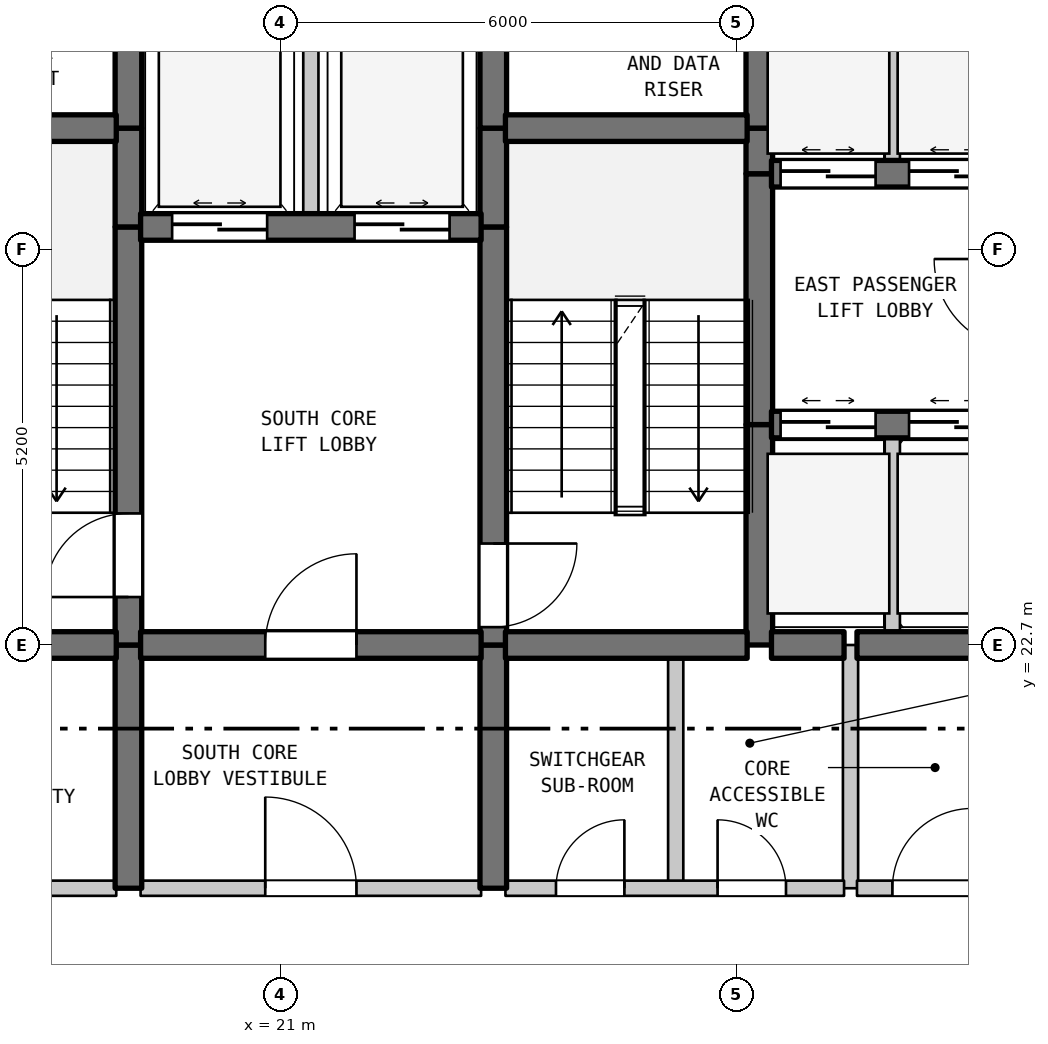
"""IFC4 building model, lengths in metres.
Left out: names, types, materials, properties, quantities, classifications, styles, units other than length and angle.
Written with IfcOpenShell. Run it as: python <this file> out.ifc"""

import sys

from ifc_helpers import new_model, si_unit, direction, frame, frame_2d, origin, place, context, subcontext, project, spatial, rectangle, extrude, element, fill, save


model = new_model("IFC4")
c1 = context("Model", 3, precision=1e-05, world=origin(), true_north=direction((0.0, 1.0)))
c2 = subcontext(c1, "Body", "Model", "MODEL_VIEW")
j1 = project(units=[si_unit("LENGTHUNIT", "METRE"), si_unit("PLANEANGLEUNIT", "RADIAN")], contexts=[c1])
p1 = place(None, origin())
s1 = spatial("IfcSite", under=j1, at=p1, CompositionType="ELEMENT")
p2 = place(p1, origin())
s2 = spatial("IfcBuilding", under=s1, at=p2, CompositionType="ELEMENT")
p3 = place(p2, frame((0.0, 0.0, 35.1)))
s3 = spatial("IfcBuildingStorey", under=s2, at=p3, CompositionType="ELEMENT", Elevation=35.1)
p4 = place(p3, frame((19.0, 19.5, 0.0), z_axis=(0.0, 0.0, 1.0), x_axis=(0.0, 1.0, 0.0)))
e1 = element("IfcWall", 1, at=p4, inside=s3, PredefinedType="SHEAR", context=c2, shape_type="SweptSolid", body=[
    extrude(rectangle(XDim=3.2, YDim=0.35, at=frame_2d((1.6, 0.0))), origin(), (0.0, 0.0, 1.0), 3.385),
])
p5 = place(p3, frame((19.0, 22.7, 0.0), z_axis=(0.0, 0.0, 1.0), x_axis=(0.0, 1.0, 0.0)))
e2 = element("IfcWall", 2, at=p5, inside=s3, PredefinedType="SHEAR", context=c2, shape_type="SweptSolid", body=[
    extrude(rectangle(XDim=5.5, YDim=0.35, at=frame_2d((2.75, 0.0))), origin(), (0.0, 0.0, 1.0), 3.385),
])
p6 = place(p5, frame((0.631, 0.0, 0.0)))
e3 = element("IfcOpeningElement", 3, at=p6, cuts=e2, PredefinedType="OPENING", context=c2, shape_type="SweptSolid", body=[
    extrude(rectangle(XDim=1.1, YDim=2.15, at=frame_2d((0.55, 1.075))), frame((0.0, 0.185, 0.0), z_axis=(0.0, -1.0, 0.0), x_axis=(1.0, 0.0, 0.0)), (0.0, 0.0, 1.0), 0.37),
])
p7 = place(p3, frame((19.0, 28.2, 0.0), z_axis=(0.0, 0.0, 1.0), x_axis=(0.0, 1.0, 0.0)))
e4 = element("IfcWall", 4, at=p7, inside=s3, PredefinedType="SHEAR", context=c2, shape_type="SweptSolid", body=[
    extrude(rectangle(XDim=1.3, YDim=0.35, at=frame_2d((0.65, 0.0))), origin(), (0.0, 0.0, 1.0), 3.385),
])
p8 = place(p3, frame((19.0, 29.5, 0.0), z_axis=(0.0, 0.0, 1.0), x_axis=(0.0, 1.0, 0.0)))
e5 = element("IfcWall", 5, at=p8, inside=s3, PredefinedType="SHEAR", context=c2, shape_type="SweptSolid", body=[
    extrude(rectangle(XDim=5.5, YDim=0.35, at=frame_2d((2.75, 0.0))), origin(), (0.0, 0.0, 1.0), 3.385),
])
p9 = place(p8, frame((2.025, 0.0, 0.0)))
e6 = element("IfcOpeningElement", 6, at=p9, cuts=e5, PredefinedType="OPENING", context=c2, shape_type="SweptSolid", body=[
    extrude(rectangle(XDim=1.1, YDim=2.15, at=frame_2d((0.55, 1.075))), frame((0.0, 0.185, 0.0), z_axis=(0.0, -1.0, 0.0), x_axis=(1.0, 0.0, 0.0)), (0.0, 0.0, 1.0), 0.37),
])
p10 = place(p3, frame((21.4, 28.2, 0.0), z_axis=(0.0, 0.0, 1.0), x_axis=(0.0, 1.0, 0.0)))
e7 = element("IfcWall", 7, at=p10, inside=s3, PredefinedType="STANDARD", context=c2, shape_type="SweptSolid", body=[
    extrude(rectangle(XDim=2.6, YDim=0.2, at=frame_2d((1.3, 0.0))), origin(), (0.0, 0.0, 1.0), 3.385),
])
p11 = place(p3, frame((23.8, 19.5, 0.0), z_axis=(0.0, 0.0, 1.0), x_axis=(0.0, 1.0, 0.0)))
e8 = element("IfcWall", 8, at=p11, inside=s3, PredefinedType="SHEAR", context=c2, shape_type="SweptSolid", body=[
    extrude(rectangle(XDim=3.2, YDim=0.35, at=frame_2d((1.6, 0.0))), origin(), (0.0, 0.0, 1.0), 3.385),
])
p12 = place(p3, frame((23.8, 22.7, 0.0), z_axis=(0.0, 0.0, 1.0), x_axis=(0.0, 1.0, 0.0)))
e9 = element("IfcWall", 9, at=p12, inside=s3, PredefinedType="SHEAR", context=c2, shape_type="SweptSolid", body=[
    extrude(rectangle(XDim=5.5, YDim=0.35, at=frame_2d((2.75, 0.0))), origin(), (0.0, 0.0, 1.0), 3.385),
])
p13 = place(p12, frame((0.235, 0.0, 0.0)))
e10 = element("IfcOpeningElement", 10, at=p13, cuts=e9, PredefinedType="OPENING", context=c2, shape_type="SweptSolid", body=[
    extrude(rectangle(XDim=1.1, YDim=2.15, at=frame_2d((0.55, 1.075))), frame((0.0, 0.185, 0.0), z_axis=(0.0, -1.0, 0.0), x_axis=(1.0, 0.0, 0.0)), (0.0, 0.0, 1.0), 0.37),
])
for number, where, z_axis, x_axis in (
    (11, (23.8, 28.2, 0.0), (0.0, 0.0, 1.0), (0.0, 1.0, 0.0)),
    (12, (23.8, 29.5, 0.0), (0.0, 0.0, 1.0), (0.0, 1.0, 0.0)),
):
    element("IfcWall", number, at=place(p3, frame(where, z_axis=z_axis, x_axis=x_axis)), inside=s3, PredefinedType="SHEAR", context=c2, shape_type="SweptSolid", body=[
        extrude(rectangle(XDim=1.3, YDim=0.35, at=frame_2d((0.65, 0.0))), origin(), (0.0, 0.0, 1.0), 3.385),
    ])
p14 = place(p3, frame((26.2, 19.5, 0.0), z_axis=(0.0, 0.0, 1.0), x_axis=(0.0, 1.0, 0.0)))
e13 = element("IfcWall", 13, at=p14, inside=s3, PredefinedType="STANDARD", context=c2, shape_type="SweptSolid", body=[
    extrude(rectangle(XDim=3.2, YDim=0.2, at=frame_2d((1.6, 0.0))), origin(), (0.0, 0.0, 1.0), 3.385),
])
p15 = place(p3, frame((27.3, 22.7, 0.0), z_axis=(0.0, 0.0, 1.0), x_axis=(0.0, 1.0, 0.0)))
e14 = element("IfcWall", 14, at=p15, inside=s3, PredefinedType="SHEAR", context=c2, shape_type="SweptSolid", body=[
    extrude(rectangle(XDim=2.9, YDim=0.35, at=frame_2d((1.45, 0.0))), origin(), (0.0, 0.0, 1.0), 3.385),
])
p16 = place(p3, frame((27.3, 25.6, 0.0), z_axis=(0.0, 0.0, 1.0), x_axis=(0.0, 1.0, 0.0)))
e15 = element("IfcWall", 15, at=p16, inside=s3, PredefinedType="SHEAR", context=c2, shape_type="SweptSolid", body=[
    extrude(rectangle(XDim=3.3, YDim=0.35, at=frame_2d((1.65, 0.0))), origin(), (0.0, 0.0, 1.0), 3.385),
])
p17 = place(p3, frame((27.3, 28.9, 0.0), z_axis=(0.0, 0.0, 1.0), x_axis=(0.0, 1.0, 0.0)))
e16 = element("IfcWall", 16, at=p17, inside=s3, PredefinedType="SHEAR", context=c2, shape_type="SweptSolid", body=[
    extrude(rectangle(XDim=0.6, YDim=0.35, at=frame_2d((0.3, 0.0))), origin(), (0.0, 0.0, 1.0), 3.385),
])
p18 = place(p3, frame((27.3, 29.5, 0.0), z_axis=(0.0, 0.0, 1.0), x_axis=(0.0, 1.0, 0.0)))
e17 = element("IfcWall", 17, at=p18, inside=s3, PredefinedType="SHEAR", context=c2, shape_type="SweptSolid", body=[
    extrude(rectangle(XDim=2.0, YDim=0.35, at=frame_2d((1.0, 0.0))), origin(), (0.0, 0.0, 1.0), 3.385),
])
p19 = place(p3, frame((28.5, 19.5, 0.0), z_axis=(0.0, 0.0, 1.0), x_axis=(0.0, 1.0, 0.0)))
e18 = element("IfcWall", 18, at=p19, inside=s3, PredefinedType="STANDARD", context=c2, shape_type="SweptSolid", body=[
    extrude(rectangle(XDim=3.2, YDim=0.2, at=frame_2d((1.6, 0.0))), origin(), (0.0, 0.0, 1.0), 3.385),
])
p20 = place(p3, frame((29.05, 22.7, 0.0), z_axis=(0.0, 0.0, 1.0), x_axis=(0.0, 1.0, 0.0)))
e19 = element("IfcWall", 19, at=p20, inside=s3, PredefinedType="STANDARD", context=c2, shape_type="SweptSolid", body=[
    extrude(rectangle(XDim=2.9, YDim=0.2, at=frame_2d((1.45, 0.0))), origin(), (0.0, 0.0, 1.0), 3.385),
])
p21 = place(p3, frame((29.05, 28.9, 0.0), z_axis=(0.0, 0.0, 1.0), x_axis=(0.0, 1.0, 0.0)))
e20 = element("IfcWall", 20, at=p21, inside=s3, PredefinedType="STANDARD", context=c2, shape_type="SweptSolid", body=[
    extrude(rectangle(XDim=2.6, YDim=0.2, at=frame_2d((1.3, 0.0))), origin(), (0.0, 0.0, 1.0), 3.385),
])
p22 = place(p3, frame((15.16, 19.5, 0.0), z_axis=(0.0, 0.0, 1.0), x_axis=(1.0, 0.0, 0.0)))
e21 = element("IfcWall", 21, at=p22, inside=s3, PredefinedType="STANDARD", context=c2, shape_type="SweptSolid", body=[
    extrude(rectangle(XDim=3.68, YDim=0.2, at=frame_2d((1.84, 0.0))), origin(), (0.0, 0.0, 1.0), 3.385),
])
p23 = place(p22, frame((1.39, 0.0, 0.0)))
e22 = element("IfcOpeningElement", 22, at=p23, cuts=e21, PredefinedType="OPENING", context=c2, shape_type="SweptSolid", body=[
    extrude(rectangle(XDim=0.9, YDim=2.15, at=frame_2d((0.45, 1.075))), frame((0.0, 0.11, 0.0), z_axis=(0.0, -1.0, 0.0), x_axis=(1.0, 0.0, 0.0)), (0.0, 0.0, 1.0), 0.22),
])
p24 = place(p3, frame((19.16, 19.5, 0.0), z_axis=(0.0, 0.0, 1.0), x_axis=(1.0, 0.0, 0.0)))
e23 = element("IfcWall", 23, at=p24, inside=s3, PredefinedType="STANDARD", context=c2, shape_type="SweptSolid", body=[
    extrude(rectangle(XDim=4.48, YDim=0.2, at=frame_2d((2.24, 0.0))), origin(), (0.0, 0.0, 1.0), 3.385),
])
p25 = place(p24, frame((1.64, 0.0, 0.0)))
e24 = element("IfcOpeningElement", 24, at=p25, cuts=e23, PredefinedType="OPENING", context=c2, shape_type="SweptSolid", body=[
    extrude(rectangle(XDim=1.2, YDim=2.2, at=frame_2d((0.6, 1.1))), frame((0.0, 0.11, 0.0), z_axis=(0.0, -1.0, 0.0), x_axis=(1.0, 0.0, 0.0)), (0.0, 0.0, 1.0), 0.22),
])
p26 = place(p3, frame((23.96, 19.5, 0.0), z_axis=(0.0, 0.0, 1.0), x_axis=(1.0, 0.0, 0.0)))
e25 = element("IfcWall", 25, at=p26, inside=s3, PredefinedType="STANDARD", context=c2, shape_type="SweptSolid", body=[
    extrude(rectangle(XDim=4.455, YDim=0.2, at=frame_2d((2.228, 0.0))), origin(), (0.0, 0.0, 1.0), 3.385),
])
p27 = place(p26, frame((0.665, 0.0, 0.0)))
e26 = element("IfcOpeningElement", 26, at=p27, cuts=e25, PredefinedType="OPENING", context=c2, shape_type="SweptSolid", body=[
    extrude(rectangle(XDim=0.9, YDim=2.15, at=frame_2d((0.45, 1.075))), frame((0.0, 0.11, 0.0), z_axis=(0.0, -1.0, 0.0), x_axis=(1.0, 0.0, 0.0)), (0.0, 0.0, 1.0), 0.22),
])
p28 = place(p26, frame((2.791, 0.0, 0.0)))
e27 = element("IfcOpeningElement", 27, at=p28, cuts=e25, PredefinedType="OPENING", context=c2, shape_type="SweptSolid", body=[
    extrude(rectangle(XDim=0.9, YDim=2.15, at=frame_2d((0.45, 1.075))), frame((0.0, 0.11, 0.0), z_axis=(0.0, -1.0, 0.0), x_axis=(1.0, 0.0, 0.0)), (0.0, 0.0, 1.0), 0.22),
])
p29 = place(p3, frame((28.585, 19.5, 0.0), z_axis=(0.0, 0.0, 1.0), x_axis=(1.0, 0.0, 0.0)))
e28 = element("IfcWall", 28, at=p29, inside=s3, PredefinedType="STANDARD", context=c2, shape_type="SweptSolid", body=[
    extrude(rectangle(XDim=2.055, YDim=0.2, at=frame_2d((1.027, 0.0))), origin(), (0.0, 0.0, 1.0), 3.385),
])
p30 = place(p29, frame((0.466, 0.0, 0.0)))
e29 = element("IfcOpeningElement", 29, at=p30, cuts=e28, PredefinedType="OPENING", context=c2, shape_type="SweptSolid", body=[
    extrude(rectangle(XDim=1.05, YDim=2.15, at=frame_2d((0.525, 1.075))), frame((0.0, 0.11, 0.0), z_axis=(0.0, -1.0, 0.0), x_axis=(1.0, 0.0, 0.0)), (0.0, 0.0, 1.0), 0.22),
])
p31 = place(p3, frame((15.16, 22.7, 0.0), z_axis=(0.0, 0.0, 1.0), x_axis=(1.0, 0.0, 0.0)))
e30 = element("IfcWall", 30, at=p31, inside=s3, PredefinedType="SHEAR", context=c2, shape_type="SweptSolid", body=[
    extrude(rectangle(XDim=3.68, YDim=0.35, at=frame_2d((1.84, 0.0))), origin(), (0.0, 0.0, 1.0), 3.385),
])
p32 = place(p3, frame((19.16, 22.7, 0.0), z_axis=(0.0, 0.0, 1.0), x_axis=(1.0, 0.0, 0.0)))
e31 = element("IfcWall", 31, at=p32, inside=s3, PredefinedType="SHEAR", context=c2, shape_type="SweptSolid", body=[
    extrude(rectangle(XDim=4.48, YDim=0.35, at=frame_2d((2.24, 0.0))), origin(), (0.0, 0.0, 1.0), 3.385),
])
p33 = place(p32, frame((1.64, 0.0, 0.0)))
e32 = element("IfcOpeningElement", 32, at=p33, cuts=e31, PredefinedType="OPENING", context=c2, shape_type="SweptSolid", body=[
    extrude(rectangle(XDim=1.2, YDim=2.2, at=frame_2d((0.6, 1.1))), frame((0.0, 0.185, 0.0), z_axis=(0.0, -1.0, 0.0), x_axis=(1.0, 0.0, 0.0)), (0.0, 0.0, 1.0), 0.37),
])
p34 = place(p3, frame((23.96, 22.7, 0.0), z_axis=(0.0, 0.0, 1.0), x_axis=(1.0, 0.0, 0.0)))
e33 = element("IfcWall", 33, at=p34, inside=s3, PredefinedType="SHEAR", context=c2, shape_type="SweptSolid", body=[
    extrude(rectangle(XDim=3.18, YDim=0.35, at=frame_2d((1.59, 0.0))), origin(), (0.0, 0.0, 1.0), 3.385),
])
p35 = place(p3, frame((27.46, 22.7, 0.0), z_axis=(0.0, 0.0, 1.0), x_axis=(1.0, 0.0, 0.0)))
e34 = element("IfcWall", 34, at=p35, inside=s3, PredefinedType="SHEAR", context=c2, shape_type="SweptSolid", body=[
    extrude(rectangle(XDim=0.955, YDim=0.35, at=frame_2d((0.478, 0.0))), origin(), (0.0, 0.0, 1.0), 3.385),
])
p36 = place(p3, frame((28.585, 22.7, 0.0), z_axis=(0.0, 0.0, 1.0), x_axis=(1.0, 0.0, 0.0)))
e35 = element("IfcWall", 35, at=p36, inside=s3, PredefinedType="SHEAR", context=c2, shape_type="SweptSolid", body=[
    extrude(rectangle(XDim=2.055, YDim=0.35, at=frame_2d((1.027, 0.0))), origin(), (0.0, 0.0, 1.0), 3.385),
])
p37 = place(p3, frame((27.46, 25.6, 0.0), z_axis=(0.0, 0.0, 1.0), x_axis=(1.0, 0.0, 0.0)))
e36 = element("IfcWall", 36, at=p37, inside=s3, PredefinedType="SHEAR", context=c2, shape_type="SweptSolid", body=[
    extrude(rectangle(XDim=3.18, YDim=0.35, at=frame_2d((1.59, 0.0))), origin(), (0.0, 0.0, 1.0), 3.385),
])
p38 = place(p37, frame((0.12, 0.0, 0.0)))
e37 = element("IfcOpeningElement", 37, at=p38, cuts=e36, PredefinedType="OPENING", context=c2, shape_type="SweptSolid", body=[
    extrude(rectangle(XDim=1.25, YDim=2.2, at=frame_2d((0.625, 1.1))), frame((0.0, 0.185, 0.0), z_axis=(0.0, -1.0, 0.0), x_axis=(1.0, 0.0, 0.0)), (0.0, 0.0, 1.0), 0.37),
])
p39 = place(p37, frame((1.81, 0.0, 0.0)))
e38 = element("IfcOpeningElement", 38, at=p39, cuts=e36, PredefinedType="OPENING", context=c2, shape_type="SweptSolid", body=[
    extrude(rectangle(XDim=1.25, YDim=2.2, at=frame_2d((0.625, 1.1))), frame((0.0, 0.185, 0.0), z_axis=(0.0, -1.0, 0.0), x_axis=(1.0, 0.0, 0.0)), (0.0, 0.0, 1.0), 0.37),
])
p40 = place(p3, frame((19.16, 28.2, 0.0), z_axis=(0.0, 0.0, 1.0), x_axis=(1.0, 0.0, 0.0)))
e39 = element("IfcWall", 39, at=p40, inside=s3, PredefinedType="SHEAR", context=c2, shape_type="SweptSolid", body=[
    extrude(rectangle(XDim=4.48, YDim=0.35, at=frame_2d((2.24, 0.0))), origin(), (0.0, 0.0, 1.0), 3.385),
])
p41 = place(p40, frame((0.415, 0.0, 0.0)))
e40 = element("IfcOpeningElement", 40, at=p41, cuts=e39, PredefinedType="OPENING", context=c2, shape_type="SweptSolid", body=[
    extrude(rectangle(XDim=1.25, YDim=2.2, at=frame_2d((0.625, 1.1))), frame((0.0, 0.185, 0.0), z_axis=(0.0, -1.0, 0.0), x_axis=(1.0, 0.0, 0.0)), (0.0, 0.0, 1.0), 0.37),
])
p42 = place(p40, frame((2.815, 0.0, 0.0)))
e41 = element("IfcOpeningElement", 41, at=p42, cuts=e39, PredefinedType="OPENING", context=c2, shape_type="SweptSolid", body=[
    extrude(rectangle(XDim=1.25, YDim=2.2, at=frame_2d((0.625, 1.1))), frame((0.0, 0.185, 0.0), z_axis=(0.0, -1.0, 0.0), x_axis=(1.0, 0.0, 0.0)), (0.0, 0.0, 1.0), 0.37),
])
p43 = place(p3, frame((27.46, 28.9, 0.0), z_axis=(0.0, 0.0, 1.0), x_axis=(1.0, 0.0, 0.0)))
e42 = element("IfcWall", 42, at=p43, inside=s3, PredefinedType="SHEAR", context=c2, shape_type="SweptSolid", body=[
    extrude(rectangle(XDim=3.18, YDim=0.35, at=frame_2d((1.59, 0.0))), origin(), (0.0, 0.0, 1.0), 3.385),
])
p44 = place(p43, frame((0.12, 0.0, 0.0)))
e43 = element("IfcOpeningElement", 43, at=p44, cuts=e42, PredefinedType="OPENING", context=c2, shape_type="SweptSolid", body=[
    extrude(rectangle(XDim=1.25, YDim=2.2, at=frame_2d((0.625, 1.1))), frame((0.0, 0.185, 0.0), z_axis=(0.0, -1.0, 0.0), x_axis=(1.0, 0.0, 0.0)), (0.0, 0.0, 1.0), 0.37),
])
p45 = place(p43, frame((1.81, 0.0, 0.0)))
e44 = element("IfcOpeningElement", 44, at=p45, cuts=e42, PredefinedType="OPENING", context=c2, shape_type="SweptSolid", body=[
    extrude(rectangle(XDim=1.25, YDim=2.2, at=frame_2d((0.625, 1.1))), frame((0.0, 0.185, 0.0), z_axis=(0.0, -1.0, 0.0), x_axis=(1.0, 0.0, 0.0)), (0.0, 0.0, 1.0), 0.37),
])
p46 = place(p3, frame((15.16, 29.5, 0.0), z_axis=(0.0, 0.0, 1.0), x_axis=(1.0, 0.0, 0.0)))
e45 = element("IfcWall", 45, at=p46, inside=s3, PredefinedType="SHEAR", context=c2, shape_type="SweptSolid", body=[
    extrude(rectangle(XDim=3.68, YDim=0.35, at=frame_2d((1.84, 0.0))), origin(), (0.0, 0.0, 1.0), 3.385),
])
p47 = place(p3, frame((23.96, 29.5, 0.0), z_axis=(0.0, 0.0, 1.0), x_axis=(1.0, 0.0, 0.0)))
e46 = element("IfcWall", 46, at=p47, inside=s3, PredefinedType="SHEAR", context=c2, shape_type="SweptSolid", body=[
    extrude(rectangle(XDim=3.18, YDim=0.35, at=frame_2d((1.59, 0.0))), origin(), (0.0, 0.0, 1.0), 3.385),
])
p48 = place(p6, origin())
e47 = element("IfcDoor", 47, at=p48, inside=s3, OperationType="SINGLE_SWING_LEFT", PredefinedType="DOOR", context=c2, shape_type="SweptSolid", body=[
    extrude(rectangle(XDim=1.1, YDim=2.15, at=frame_2d((0.55, 1.075))), frame((0.0, 0.025, 0.0), z_axis=(0.0, -1.0, 0.0), x_axis=(1.0, 0.0, 0.0)), (0.0, 0.0, 1.0), 0.05),
])
fill(e3, e47)
p49 = place(p13, frame((1.1, 0.0, 0.0), z_axis=(0.0, 0.0, 1.0), x_axis=(-1.0, 0.0, 0.0)))
e48 = element("IfcDoor", 48, at=p49, inside=s3, OperationType="SINGLE_SWING_RIGHT", PredefinedType="DOOR", context=c2, shape_type="SweptSolid", body=[
    extrude(rectangle(XDim=1.1, YDim=2.15, at=frame_2d((0.55, 1.075))), frame((0.0, 0.025, 0.0), z_axis=(0.0, -1.0, 0.0), x_axis=(1.0, 0.0, 0.0)), (0.0, 0.0, 1.0), 0.05),
])
fill(e10, e48)
p50 = place(p25, origin())
e49 = element("IfcDoor", 49, at=p50, inside=s3, OperationType="SINGLE_SWING_LEFT", PredefinedType="DOOR", context=c2, shape_type="SweptSolid", body=[
    extrude(rectangle(XDim=1.2, YDim=2.2, at=frame_2d((0.6, 1.1))), frame((0.0, 0.025, 0.0), z_axis=(0.0, -1.0, 0.0), x_axis=(1.0, 0.0, 0.0)), (0.0, 0.0, 1.0), 0.05),
])
fill(e24, e49)
p51 = place(p27, origin())
e50 = element("IfcDoor", 50, at=p51, inside=s3, OperationType="SINGLE_SWING_RIGHT", PredefinedType="DOOR", context=c2, shape_type="SweptSolid", body=[
    extrude(rectangle(XDim=0.9, YDim=2.15, at=frame_2d((0.45, 1.075))), frame((0.0, 0.025, 0.0), z_axis=(0.0, -1.0, 0.0), x_axis=(1.0, 0.0, 0.0)), (0.0, 0.0, 1.0), 0.05),
])
fill(e26, e50)
p52 = place(p28, origin())
e51 = element("IfcDoor", 51, at=p52, inside=s3, OperationType="SINGLE_SWING_LEFT", PredefinedType="DOOR", context=c2, shape_type="SweptSolid", body=[
    extrude(rectangle(XDim=0.9, YDim=2.15, at=frame_2d((0.45, 1.075))), frame((0.0, 0.025, 0.0), z_axis=(0.0, -1.0, 0.0), x_axis=(1.0, 0.0, 0.0)), (0.0, 0.0, 1.0), 0.05),
])
fill(e27, e51)
p53 = place(p30, origin())
e52 = element("IfcDoor", 52, at=p53, inside=s3, OperationType="SINGLE_SWING_RIGHT", PredefinedType="DOOR", context=c2, shape_type="SweptSolid", body=[
    extrude(rectangle(XDim=1.05, YDim=2.15, at=frame_2d((0.525, 1.075))), frame((0.0, 0.025, 0.0), z_axis=(0.0, -1.0, 0.0), x_axis=(1.0, 0.0, 0.0)), (0.0, 0.0, 1.0), 0.05),
])
fill(e29, e52)
p54 = place(p33, origin())
e53 = element("IfcDoor", 53, at=p54, inside=s3, OperationType="SINGLE_SWING_RIGHT", PredefinedType="DOOR", context=c2, shape_type="SweptSolid", body=[
    extrude(rectangle(XDim=1.2, YDim=2.2, at=frame_2d((0.6, 1.1))), frame((0.0, 0.025, 0.0), z_axis=(0.0, -1.0, 0.0), x_axis=(1.0, 0.0, 0.0)), (0.0, 0.0, 1.0), 0.05),
])
fill(e32, e53)
p55 = place(p38, origin())
e54 = element("IfcDoor", 54, at=p55, inside=s3, OperationType="DOUBLE_DOOR_SLIDING", PredefinedType="DOOR", context=c2, shape_type="SweptSolid", body=[
    extrude(rectangle(XDim=1.25, YDim=2.2, at=frame_2d((0.625, 1.1))), frame((0.0, 0.025, 0.0), z_axis=(0.0, -1.0, 0.0), x_axis=(1.0, 0.0, 0.0)), (0.0, 0.0, 1.0), 0.05),
])
fill(e37, e54)
p56 = place(p39, origin())
e55 = element("IfcDoor", 55, at=p56, inside=s3, OperationType="DOUBLE_DOOR_SLIDING", PredefinedType="DOOR", context=c2, shape_type="SweptSolid", body=[
    extrude(rectangle(XDim=1.25, YDim=2.2, at=frame_2d((0.625, 1.1))), frame((0.0, 0.025, 0.0), z_axis=(0.0, -1.0, 0.0), x_axis=(1.0, 0.0, 0.0)), (0.0, 0.0, 1.0), 0.05),
])
fill(e38, e55)
p57 = place(p41, origin())
e56 = element("IfcDoor", 56, at=p57, inside=s3, OperationType="DOUBLE_DOOR_SLIDING", PredefinedType="DOOR", context=c2, shape_type="SweptSolid", body=[
    extrude(rectangle(XDim=1.25, YDim=2.2, at=frame_2d((0.625, 1.1))), frame((0.0, 0.025, 0.0), z_axis=(0.0, -1.0, 0.0), x_axis=(1.0, 0.0, 0.0)), (0.0, 0.0, 1.0), 0.05),
])
fill(e40, e56)
p58 = place(p42, origin())
e57 = element("IfcDoor", 57, at=p58, inside=s3, OperationType="DOUBLE_DOOR_SLIDING", PredefinedType="DOOR", context=c2, shape_type="SweptSolid", body=[
    extrude(rectangle(XDim=1.25, YDim=2.2, at=frame_2d((0.625, 1.1))), frame((0.0, 0.025, 0.0), z_axis=(0.0, -1.0, 0.0), x_axis=(1.0, 0.0, 0.0)), (0.0, 0.0, 1.0), 0.05),
])
fill(e41, e57)
p59 = place(p44, origin())
e58 = element("IfcDoor", 58, at=p59, inside=s3, OperationType="DOUBLE_DOOR_SLIDING", PredefinedType="DOOR", context=c2, shape_type="SweptSolid", body=[
    extrude(rectangle(XDim=1.25, YDim=2.2, at=frame_2d((0.625, 1.1))), frame((0.0, 0.025, 0.0), z_axis=(0.0, -1.0, 0.0), x_axis=(1.0, 0.0, 0.0)), (0.0, 0.0, 1.0), 0.05),
])
fill(e43, e58)
p60 = place(p45, origin())
e59 = element("IfcDoor", 59, at=p60, inside=s3, OperationType="DOUBLE_DOOR_SLIDING", PredefinedType="DOOR", context=c2, shape_type="SweptSolid", body=[
    extrude(rectangle(XDim=1.25, YDim=2.2, at=frame_2d((0.625, 1.1))), frame((0.0, 0.025, 0.0), z_axis=(0.0, -1.0, 0.0), x_axis=(1.0, 0.0, 0.0)), (0.0, 0.0, 1.0), 0.05),
])
fill(e44, e59)
save(model, sys.argv[1])
